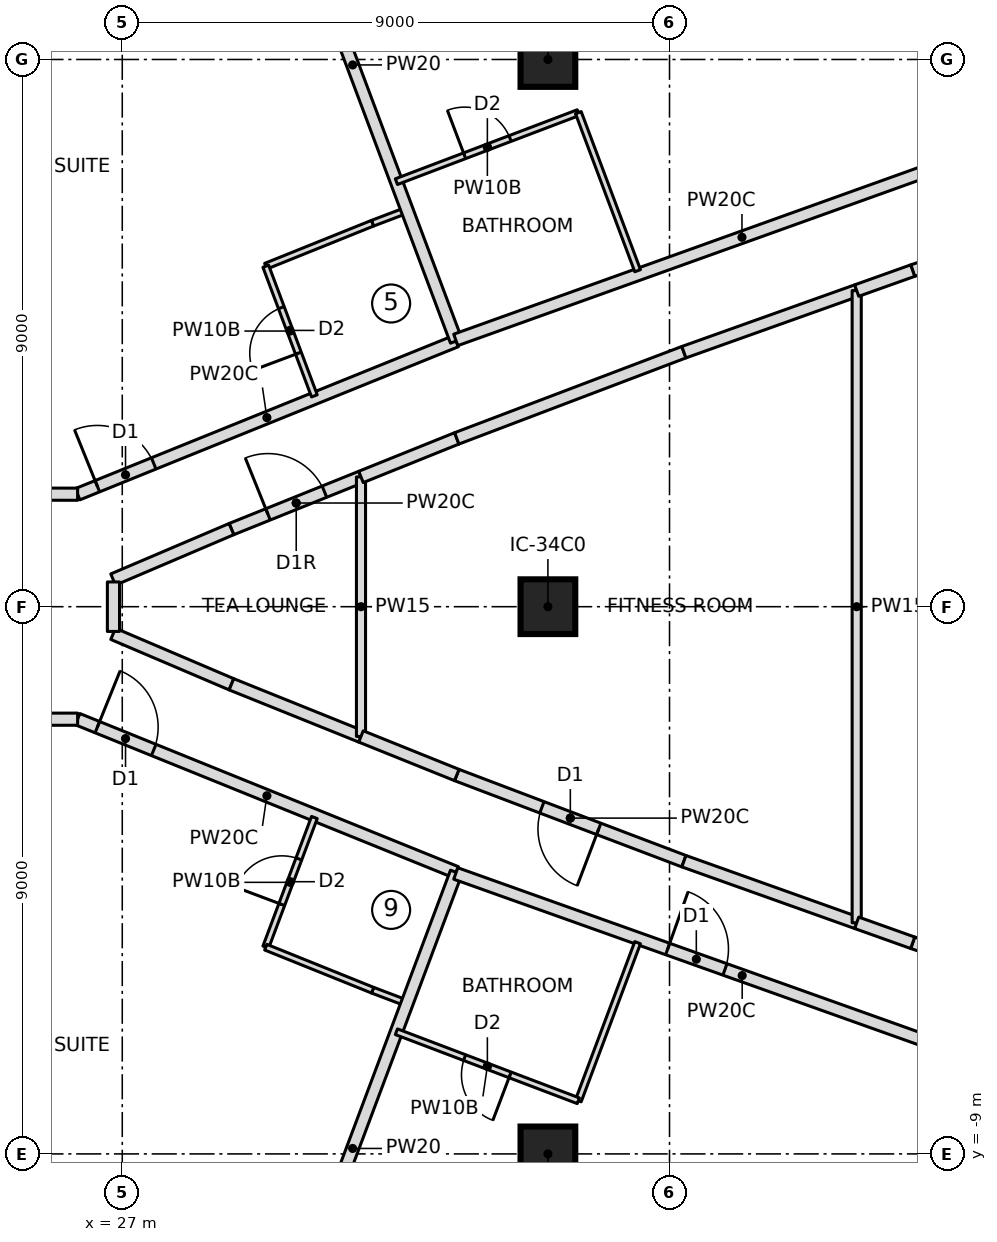
"""IFC4 building model, lengths in metres.
Left out: names, types, materials, properties, quantities, classifications, styles, units other than length and angle.
Written with IfcOpenShell. Run it as: python <this file> out.ifc"""

import sys

from ifc_helpers import new_model, si_unit, direction, frame, frame_2d, origin, origin_2d, place, context, subcontext, project, spatial, rectangle, extrude, element, fill, save


model = new_model("IFC4")
c1 = context("Model", 3, precision=1e-05, world=origin(), true_north=direction((0.0, 1.0)))
c2 = subcontext(c1, "Body", "Model", "MODEL_VIEW")
j1 = project(units=[si_unit("LENGTHUNIT", "METRE"), si_unit("PLANEANGLEUNIT", "RADIAN")], contexts=[c1])
p1 = place(None, origin())
s1 = spatial("IfcSite", under=j1, at=p1, CompositionType="ELEMENT")
p2 = place(p1, origin())
s2 = spatial("IfcBuilding", under=s1, at=p2, CompositionType="ELEMENT")
p3 = place(p2, frame((0.0, 0.0, 231.45)))
s3 = spatial("IfcBuildingStorey", under=s2, at=p3, CompositionType="ELEMENT", Elevation=231.45)
for number, where, z_axis, x_axis in (
    (1, (34.0, -9.0, 0.0), (0.0, 0.0, 1.0), (1.0, 0.0, 0.0)),
    (2, (34.0, 0.0, 0.0), (0.0, 0.0, 1.0), (1.0, 0.0, 0.0)),
    (3, (34.0, 9.0, 0.0), (0.0, 0.0, 1.0), (1.0, 0.0, 0.0)),
):
    element("IfcColumn", number, at=place(p3, frame(where, z_axis=z_axis, x_axis=x_axis)), inside=s3, PredefinedType="COLUMN", context=c2, shape_type="SweptSolid", body=[
        extrude(rectangle(XDim=0.9, YDim=0.9, at=origin_2d()), origin(), (0.0, 0.0, 1.0), 3.55),
    ])
p4 = place(p3, frame((26.266, 1.85, 0.0), z_axis=(0.0, 0.0, 1.0), x_axis=(0.927007906702, 0.375041785555, 0.0)))
e4 = element("IfcWall", 4, at=p4, inside=s3, PredefinedType="PARTITIONING", context=c2, shape_type="SweptSolid", body=[
    extrude(rectangle(XDim=6.716, YDim=0.2, at=frame_2d((3.358, 0.0))), origin(), (0.0, 0.0, 1.0), 3.25),
])
p5 = place(p4, frame((0.35, 0.0, 0.0)))
e5 = element("IfcOpeningElement", 5, at=p5, cuts=e4, PredefinedType="OPENING", context=c2, shape_type="SweptSolid", body=[
    extrude(rectangle(XDim=1.0, YDim=2.1, at=frame_2d((0.5, 1.05))), frame((0.0, 0.11, 0.0), z_axis=(0.0, -1.0, 0.0), x_axis=(1.0, 0.0, 0.0)), (0.0, 0.0, 1.0), 0.22),
])
p6 = place(p3, frame((29.36, 5.6, 0.0), z_axis=(0.0, 0.0, 1.0), x_axis=(0.927594225674, 0.373589283166, 0.0)))
e6 = element("IfcWall", 6, at=p6, inside=s3, PredefinedType="PARTITIONING", context=c2, shape_type="SweptSolid", body=[
    extrude(rectangle(XDim=1.895, YDim=0.1, at=frame_2d((0.947, 0.0))), origin(), (0.0, 0.0, 1.0), 3.25),
])
p7 = place(p3, frame((31.117, 6.308, 0.0), z_axis=(0.0, 0.0, 1.0), x_axis=(0.935048188903, 0.354520640342, 0.0)))
e7 = element("IfcWall", 7, at=p7, inside=s3, PredefinedType="PARTITIONING", context=c2, shape_type="SweptSolid", body=[
    extrude(rectangle(XDim=0.606, YDim=0.1, at=frame_2d((0.303, 0.0))), origin(), (0.0, 0.0, 1.0), 3.25),
])
p8 = place(p3, frame((30.16, 3.467, 0.0), z_axis=(0.0, 0.0, 1.0), x_axis=(-0.351158682313, 0.936315961541, 0.0)))
e8 = element("IfcWall", 8, at=p8, inside=s3, PredefinedType="PARTITIONING", context=c2, shape_type="SweptSolid", body=[
    extrude(rectangle(XDim=2.278, YDim=0.1, at=frame_2d((1.139, 0.0))), origin(), (0.0, 0.0, 1.0), 3.25),
])
p9 = place(p8, frame((0.75, 0.0, 0.0)))
e9 = element("IfcOpeningElement", 9, at=p9, cuts=e8, PredefinedType="OPENING", context=c2, shape_type="SweptSolid", body=[
    extrude(rectangle(XDim=0.8, YDim=2.1, at=frame_2d((0.4, 1.05))), frame((0.0, 0.06, 0.0), z_axis=(0.0, -1.0, 0.0), x_axis=(1.0, 0.0, 0.0)), (0.0, 0.0, 1.0), 0.12),
])
p10 = place(p3, frame((32.492, 4.369, 0.0), z_axis=(0.0, 0.0, 1.0), x_axis=(-0.351128958016, 0.93632710889, 0.0)))
e10 = element("IfcWall", 10, at=p10, inside=s3, PredefinedType="PARTITIONING", context=c2, shape_type="SweptSolid", body=[
    extrude(rectangle(XDim=9.7, YDim=0.2, at=frame_2d((4.85, 0.0))), origin(), (0.0, 0.0, 1.0), 3.25),
])
p11 = place(p3, frame((41.898, 7.764, 0.0), z_axis=(0.0, 0.0, 1.0), x_axis=(-0.941277643829, -0.337633525034, 0.0)))
e11 = element("IfcWall", 11, at=p11, inside=s3, PredefinedType="PARTITIONING", context=c2, shape_type="SweptSolid", body=[
    extrude(rectangle(XDim=10.001, YDim=0.2, at=frame_2d((5.0, 0.0))), origin(), (0.0, 0.0, 1.0), 3.25),
])
p12 = place(p11, frame((0.35, 0.0, 0.0)))
e12 = element("IfcOpeningElement", 12, at=p12, cuts=e11, PredefinedType="OPENING", context=c2, shape_type="SweptSolid", body=[
    extrude(rectangle(XDim=1.0, YDim=2.1, at=frame_2d((0.5, 1.05))), frame((0.0, 0.11, 0.0), z_axis=(0.0, -1.0, 0.0), x_axis=(1.0, 0.0, 0.0)), (0.0, 0.0, 1.0), 0.22),
])
p13 = place(p3, frame((31.509, 6.991, 0.0), z_axis=(0.0, 0.0, 1.0), x_axis=(0.934948661714, 0.354783032232, 0.0)))
e13 = element("IfcWall", 13, at=p13, inside=s3, PredefinedType="PARTITIONING", context=c2, shape_type="SweptSolid", body=[
    extrude(rectangle(XDim=3.2, YDim=0.1, at=frame_2d((1.6, 0.0))), origin(), (0.0, 0.0, 1.0), 3.25),
])
p14 = place(p13, frame((1.2, 0.0, 0.0)))
e14 = element("IfcOpeningElement", 14, at=p14, cuts=e13, PredefinedType="OPENING", context=c2, shape_type="SweptSolid", body=[
    extrude(rectangle(XDim=0.8, YDim=2.1, at=frame_2d((0.4, 1.05))), frame((0.0, 0.06, 0.0), z_axis=(0.0, -1.0, 0.0), x_axis=(1.0, 0.0, 0.0)), (0.0, 0.0, 1.0), 0.12),
])
p15 = place(p3, frame((34.5, 8.126, 0.0), z_axis=(0.0, 0.0, 1.0), x_axis=(0.351065630332, -0.936350854755, 0.0)))
e15 = element("IfcWall", 15, at=p15, inside=s3, PredefinedType="PARTITIONING", context=c2, shape_type="SweptSolid", body=[
    extrude(rectangle(XDim=2.777, YDim=0.1, at=frame_2d((1.388, 0.0))), origin(), (0.0, 0.0, 1.0), 3.25),
])
p16 = place(p3, frame((41.906, 7.746, 0.0), z_axis=(0.0, 0.0, 1.0), x_axis=(-0.35112895446, 0.936327110224, 0.0)))
e16 = element("IfcWall", 16, at=p16, inside=s3, PredefinedType="PARTITIONING", context=c2, shape_type="SweptSolid", body=[
    extrude(rectangle(XDim=9.706, YDim=0.2, at=frame_2d((4.853, 0.0))), origin(), (0.0, 0.0, 1.0), 3.25),
])
p17 = place(p3, frame((26.266, -1.85, 0.0), z_axis=(0.0, 0.0, 1.0), x_axis=(0.927007906702, -0.375041785555, 0.0)))
e17 = element("IfcWall", 17, at=p17, inside=s3, PredefinedType="PARTITIONING", context=c2, shape_type="SweptSolid", body=[
    extrude(rectangle(XDim=6.716, YDim=0.2, at=frame_2d((3.358, 0.0))), origin(), (0.0, 0.0, 1.0), 3.25),
])
p18 = place(p17, frame((0.35, 0.0, 0.0)))
e18 = element("IfcOpeningElement", 18, at=p18, cuts=e17, PredefinedType="OPENING", context=c2, shape_type="SweptSolid", body=[
    extrude(rectangle(XDim=1.0, YDim=2.1, at=frame_2d((0.5, 1.05))), frame((0.0, 0.11, 0.0), z_axis=(0.0, -1.0, 0.0), x_axis=(1.0, 0.0, 0.0)), (0.0, 0.0, 1.0), 0.22),
])
p19 = place(p3, frame((29.36, -5.6, 0.0), z_axis=(0.0, 0.0, 1.0), x_axis=(0.351158682313, 0.936315961541, 0.0)))
e19 = element("IfcWall", 19, at=p19, inside=s3, PredefinedType="PARTITIONING", context=c2, shape_type="SweptSolid", body=[
    extrude(rectangle(XDim=2.278, YDim=0.1, at=frame_2d((1.139, 0.0))), origin(), (0.0, 0.0, 1.0), 3.25),
])
p20 = place(p19, frame((0.75, 0.0, 0.0)))
e20 = element("IfcOpeningElement", 20, at=p20, cuts=e19, PredefinedType="OPENING", context=c2, shape_type="SweptSolid", body=[
    extrude(rectangle(XDim=0.8, YDim=2.1, at=frame_2d((0.4, 1.05))), frame((0.0, 0.06, 0.0), z_axis=(0.0, -1.0, 0.0), x_axis=(1.0, 0.0, 0.0)), (0.0, 0.0, 1.0), 0.12),
])
p21 = place(p3, frame((31.684, -6.522, 0.0), z_axis=(0.0, 0.0, 1.0), x_axis=(-0.935048188903, 0.354520640342, 0.0)))
e21 = element("IfcWall", 21, at=p21, inside=s3, PredefinedType="PARTITIONING", context=c2, shape_type="SweptSolid", body=[
    extrude(rectangle(XDim=0.606, YDim=0.1, at=frame_2d((0.303, 0.0))), origin(), (0.0, 0.0, 1.0), 3.25),
])
p22 = place(p3, frame((31.117, -6.308, 0.0), z_axis=(0.0, 0.0, 1.0), x_axis=(-0.927594225674, 0.373589283166, 0.0)))
e22 = element("IfcWall", 22, at=p22, inside=s3, PredefinedType="PARTITIONING", context=c2, shape_type="SweptSolid", body=[
    extrude(rectangle(XDim=1.895, YDim=0.1, at=frame_2d((0.947, 0.0))), origin(), (0.0, 0.0, 1.0), 3.25),
])
p23 = place(p3, frame((29.086, -13.451, 0.0), z_axis=(0.0, 0.0, 1.0), x_axis=(0.351128958016, 0.93632710889, 0.0)))
e23 = element("IfcWall", 23, at=p23, inside=s3, PredefinedType="PARTITIONING", context=c2, shape_type="SweptSolid", body=[
    extrude(rectangle(XDim=9.7, YDim=0.2, at=frame_2d((4.85, 0.0))), origin(), (0.0, 0.0, 1.0), 3.25),
])
p24 = place(p3, frame((32.485, -4.388, 0.0), z_axis=(0.0, 0.0, 1.0), x_axis=(0.941953797829, -0.335742524498, 0.0)))
e24 = element("IfcWall", 24, at=p24, inside=s3, PredefinedType="PARTITIONING", context=c2, shape_type="SweptSolid", body=[
    extrude(rectangle(XDim=10.001, YDim=0.2, at=frame_2d((5.001, 0.0))), origin(), (0.0, 0.0, 1.0), 3.25),
])
p25 = place(p24, frame((3.7, 0.0, 0.0)))
e25 = element("IfcOpeningElement", 25, at=p25, cuts=e24, PredefinedType="OPENING", context=c2, shape_type="SweptSolid", body=[
    extrude(rectangle(XDim=1.0, YDim=2.1, at=frame_2d((0.5, 1.05))), frame((0.0, 0.11, 0.0), z_axis=(0.0, -1.0, 0.0), x_axis=(1.0, 0.0, 0.0)), (0.0, 0.0, 1.0), 0.22),
])
p26 = place(p3, frame((35.475, -5.526, 0.0), z_axis=(0.0, 0.0, 1.0), x_axis=(-0.351065630332, -0.936350854755, 0.0)))
e26 = element("IfcWall", 26, at=p26, inside=s3, PredefinedType="PARTITIONING", context=c2, shape_type="SweptSolid", body=[
    extrude(rectangle(XDim=2.777, YDim=0.1, at=frame_2d((1.388, 0.0))), origin(), (0.0, 0.0, 1.0), 3.25),
])
p27 = place(p3, frame((34.5, -8.126, 0.0), z_axis=(0.0, 0.0, 1.0), x_axis=(-0.934948661714, 0.354783032232, 0.0)))
e27 = element("IfcWall", 27, at=p27, inside=s3, PredefinedType="PARTITIONING", context=c2, shape_type="SweptSolid", body=[
    extrude(rectangle(XDim=3.2, YDim=0.1, at=frame_2d((1.6, 0.0))), origin(), (0.0, 0.0, 1.0), 3.25),
])
p28 = place(p27, frame((1.2, 0.0, 0.0)))
e28 = element("IfcOpeningElement", 28, at=p28, cuts=e27, PredefinedType="OPENING", context=c2, shape_type="SweptSolid", body=[
    extrude(rectangle(XDim=0.8, YDim=2.1, at=frame_2d((0.4, 1.05))), frame((0.0, 0.06, 0.0), z_axis=(0.0, -1.0, 0.0), x_axis=(1.0, 0.0, 0.0)), (0.0, 0.0, 1.0), 0.12),
])
p29 = place(p3, frame((38.497, -16.834, 0.0), z_axis=(0.0, 0.0, 1.0), x_axis=(0.35112895446, 0.936327110224, 0.0)))
e29 = element("IfcWall", 29, at=p29, inside=s3, PredefinedType="PARTITIONING", context=c2, shape_type="SweptSolid", body=[
    extrude(rectangle(XDim=9.706, YDim=0.2, at=frame_2d((4.853, 0.0))), origin(), (0.0, 0.0, 1.0), 3.25),
])
p30 = place(p3, frame((28.796, 1.276, 0.0), z_axis=(0.0, 0.0, 1.0), x_axis=(0.927609077038, 0.373552406224, 0.0)))
e30 = element("IfcWall", 30, at=p30, inside=s3, PredefinedType="PARTITIONING", context=c2, shape_type="SweptSolid", body=[
    extrude(rectangle(XDim=2.297, YDim=0.2, at=frame_2d((1.148, 0.0))), origin(), (0.0, 0.0, 1.0), 3.25),
])
p31 = place(p30, frame((0.648, 0.0, 0.0)))
e31 = element("IfcOpeningElement", 31, at=p31, cuts=e30, PredefinedType="OPENING", context=c2, shape_type="SweptSolid", body=[
    extrude(rectangle(XDim=1.0, YDim=2.1, at=frame_2d((0.5, 1.05))), frame((0.0, 0.11, 0.0), z_axis=(0.0, -1.0, 0.0), x_axis=(1.0, 0.0, 0.0)), (0.0, 0.0, 1.0), 0.22),
])
for number, where, z_axis, x_axis in (
    (32, (28.796, -1.276, 0.0), (0.0, 0.0, 1.0), (-0.92, 0.392, 0.0)),
    (33, (26.85, 0.447, 0.0), (0.0, 0.0, 1.0), (0.92, 0.392, 0.0)),
):
    element("IfcWall", number, at=place(p3, frame(where, z_axis=z_axis, x_axis=x_axis)), inside=s3, PredefinedType="PARTITIONING", context=c2, shape_type="SweptSolid", body=[
        extrude(rectangle(XDim=2.115, YDim=0.2, at=frame_2d((1.058, 0.0))), origin(), (0.0, 0.0, 1.0), 3.25),
    ])
p32 = place(p3, frame((30.926, -2.134, 0.0), z_axis=(0.0, 0.0, 1.0), x_axis=(-0.927609077038, 0.373552406224, 0.0)))
e34 = element("IfcWall", 34, at=p32, inside=s3, PredefinedType="PARTITIONING", context=c2, shape_type="SweptSolid", body=[
    extrude(rectangle(XDim=2.297, YDim=0.2, at=frame_2d((1.148, 0.0))), origin(), (0.0, 0.0, 1.0), 3.25),
])
p33 = place(p3, frame((30.926, -2.134, 0.0), z_axis=(0.0, 0.0, 1.0), x_axis=(0.0, 1.0, 0.0)))
e35 = element("IfcWall", 35, at=p33, inside=s3, PredefinedType="PARTITIONING", context=c2, shape_type="SweptSolid", body=[
    extrude(rectangle(XDim=4.268, YDim=0.15, at=frame_2d((2.134, 0.0))), origin(), (0.0, 0.0, 1.0), 3.25),
])
p34 = place(p3, frame((36.236, -4.186, 0.0), z_axis=(0.0, 0.0, 1.0), x_axis=(-0.934950696546, 0.354777669856, 0.0)))
e36 = element("IfcWall", 36, at=p34, inside=s3, PredefinedType="PARTITIONING", context=c2, shape_type="SweptSolid", body=[
    extrude(rectangle(XDim=3.995, YDim=0.2, at=frame_2d((1.997, 0.0))), origin(), (0.0, 0.0, 1.0), 3.25),
])
p35 = place(p34, frame((1.498, 0.0, 0.0)))
e37 = element("IfcOpeningElement", 37, at=p35, cuts=e36, PredefinedType="OPENING", context=c2, shape_type="SweptSolid", body=[
    extrude(rectangle(XDim=1.0, YDim=2.1, at=frame_2d((0.5, 1.05))), frame((0.0, 0.11, 0.0), z_axis=(0.0, -1.0, 0.0), x_axis=(1.0, 0.0, 0.0)), (0.0, 0.0, 1.0), 0.22),
])
p36 = place(p3, frame((39.078, -5.199, 0.0), z_axis=(0.0, 0.0, 1.0), x_axis=(-0.941908381697, 0.335869916023, 0.0)))
e38 = element("IfcWall", 38, at=p36, inside=s3, PredefinedType="PARTITIONING", context=c2, shape_type="SweptSolid", body=[
    extrude(rectangle(XDim=3.017, YDim=0.2, at=frame_2d((1.509, 0.0))), origin(), (0.0, 0.0, 1.0), 3.25),
])
for number, where, z_axis, x_axis in (
    (39, (32.501, -2.768, 0.0), (0.0, 0.0, 1.0), (-0.928, 0.373, 0.0)),
    (40, (30.926, 2.134, 0.0), (0.0, 0.0, 1.0), (0.928, 0.373, 0.0)),
):
    element("IfcWall", number, at=place(p3, frame(where, z_axis=z_axis, x_axis=x_axis)), inside=s3, PredefinedType="PARTITIONING", context=c2, shape_type="SweptSolid", body=[
        extrude(rectangle(XDim=1.698, YDim=0.2, at=frame_2d((0.849, 0.0))), origin(), (0.0, 0.0, 1.0), 3.25),
    ])
p37 = place(p3, frame((32.501, 2.768, 0.0), z_axis=(0.0, 0.0, 1.0), x_axis=(0.934950696546, 0.354777669856, 0.0)))
e41 = element("IfcWall", 41, at=p37, inside=s3, PredefinedType="PARTITIONING", context=c2, shape_type="SweptSolid", body=[
    extrude(rectangle(XDim=3.995, YDim=0.2, at=frame_2d((1.997, 0.0))), origin(), (0.0, 0.0, 1.0), 3.25),
])
p38 = place(p3, frame((36.236, 4.186, 0.0), z_axis=(0.0, 0.0, 1.0), x_axis=(0.941908381697, 0.335869916023, 0.0)))
e42 = element("IfcWall", 42, at=p38, inside=s3, PredefinedType="PARTITIONING", context=c2, shape_type="SweptSolid", body=[
    extrude(rectangle(XDim=3.017, YDim=0.2, at=frame_2d((1.509, 0.0))), origin(), (0.0, 0.0, 1.0), 3.25),
])
p39 = place(p3, frame((39.078, -5.199, 0.0), z_axis=(0.0, 0.0, 1.0), x_axis=(0.0, 1.0, 0.0)))
e43 = element("IfcWall", 43, at=p39, inside=s3, PredefinedType="PARTITIONING", context=c2, shape_type="SweptSolid", body=[
    extrude(rectangle(XDim=10.398, YDim=0.15, at=frame_2d((5.199, 0.0))), origin(), (0.0, 0.0, 1.0), 3.25),
])
p40 = place(p3, frame((39.999, 5.527, 0.0), z_axis=(0.0, 0.0, 1.0), x_axis=(0.9484714727, 0.316862534034, 0.0)))
e44 = element("IfcWall", 44, at=p40, inside=s3, PredefinedType="PARTITIONING", context=c2, shape_type="SweptSolid", body=[
    extrude(rectangle(XDim=2.192, YDim=0.2, at=frame_2d((1.096, 0.0))), origin(), (0.0, 0.0, 1.0), 3.25),
])
p41 = place(p40, frame((0.596, 0.0, 0.0)))
e45 = element("IfcOpeningElement", 45, at=p41, cuts=e44, PredefinedType="OPENING", context=c2, shape_type="SweptSolid", body=[
    extrude(rectangle(XDim=1.0, YDim=2.1, at=frame_2d((0.5, 1.05))), frame((0.0, 0.11, 0.0), z_axis=(0.0, -1.0, 0.0), x_axis=(1.0, 0.0, 0.0)), (0.0, 0.0, 1.0), 0.22),
])
p42 = place(p3, frame((42.078, -6.222, 0.0), z_axis=(0.0, 0.0, 1.0), x_axis=(-0.9484714727, 0.316862534034, 0.0)))
e46 = element("IfcWall", 46, at=p42, inside=s3, PredefinedType="PARTITIONING", context=c2, shape_type="SweptSolid", body=[
    extrude(rectangle(XDim=2.192, YDim=0.2, at=frame_2d((1.096, 0.0))), origin(), (0.0, 0.0, 1.0), 3.25),
])
for number, where, z_axis, x_axis in (
    (47, (39.999, -5.527, 0.0), (0.0, 0.0, 1.0), (-0.942, 0.336, 0.0)),
    (48, (39.078, 5.199, 0.0), (0.0, 0.0, 1.0), (0.942, 0.336, 0.0)),
):
    element("IfcWall", number, at=place(p3, frame(where, z_axis=z_axis, x_axis=x_axis)), inside=s3, PredefinedType="PARTITIONING", context=c2, shape_type="SweptSolid", body=[
        extrude(rectangle(XDim=0.978, YDim=0.2, at=frame_2d((0.489, 0.0))), origin(), (0.0, 0.0, 1.0), 3.25),
    ])
p43 = place(p3, frame((26.855, -0.407, 0.0), z_axis=(0.0, 0.0, 1.0), x_axis=(0.0, 1.0, 0.0)))
e49 = element("IfcWall", 49, at=p43, inside=s3, PredefinedType="PARTITIONING", context=c2, shape_type="SweptSolid", body=[
    extrude(rectangle(XDim=0.814, YDim=0.2, at=frame_2d((0.407, 0.0))), origin(), (0.0, 0.0, 1.0), 3.25),
])
p44 = place(p3, frame((26.266, 1.85, 0.0), z_axis=(0.0, 0.0, 1.0), x_axis=(-0.999998892962, 0.001487977051, 0.0)))
e50 = element("IfcWall", 50, at=p44, inside=s3, PredefinedType="PARTITIONING", context=c2, shape_type="SweptSolid", body=[
    extrude(rectangle(XDim=3.117, YDim=0.2, at=frame_2d((1.559, 0.0))), origin(), (0.0, 0.0, 1.0), 3.25),
])
p45 = place(p3, frame((23.148, -1.854, 0.0), z_axis=(0.0, 0.0, 1.0), x_axis=(0.999999006581, 0.001409552241, 0.0)))
e51 = element("IfcWall", 51, at=p45, inside=s3, PredefinedType="PARTITIONING", context=c2, shape_type="SweptSolid", body=[
    extrude(rectangle(XDim=3.118, YDim=0.2, at=frame_2d((1.559, 0.0))), origin(), (0.0, 0.0, 1.0), 3.25),
])
p46 = place(p9, origin())
e52 = element("IfcDoor", 52, at=p46, inside=s3, OperationType="SINGLE_SWING_LEFT", PredefinedType="DOOR", context=c2, shape_type="SweptSolid", body=[
    extrude(rectangle(XDim=0.8, YDim=2.1, at=frame_2d((0.4, 1.05))), frame((0.0, 0.025, 0.0), z_axis=(0.0, -1.0, 0.0), x_axis=(1.0, 0.0, 0.0)), (0.0, 0.0, 1.0), 0.05),
])
fill(e9, e52)
p47 = place(p5, origin())
e53 = element("IfcDoor", 53, at=p47, inside=s3, OperationType="SINGLE_SWING_LEFT", PredefinedType="DOOR", context=c2, shape_type="SweptSolid", body=[
    extrude(rectangle(XDim=1.0, YDim=2.1, at=frame_2d((0.5, 1.05))), frame((0.0, 0.025, 0.0), z_axis=(0.0, -1.0, 0.0), x_axis=(1.0, 0.0, 0.0)), (0.0, 0.0, 1.0), 0.05),
])
fill(e5, e53)
p48 = place(p14, origin())
e54 = element("IfcDoor", 54, at=p48, inside=s3, OperationType="SINGLE_SWING_LEFT", PredefinedType="DOOR", context=c2, shape_type="SweptSolid", body=[
    extrude(rectangle(XDim=0.8, YDim=2.1, at=frame_2d((0.4, 1.05))), frame((0.0, 0.025, 0.0), z_axis=(0.0, -1.0, 0.0), x_axis=(1.0, 0.0, 0.0)), (0.0, 0.0, 1.0), 0.05),
])
fill(e14, e54)
p49 = place(p20, origin())
e55 = element("IfcDoor", 55, at=p49, inside=s3, OperationType="SINGLE_SWING_LEFT", PredefinedType="DOOR", context=c2, shape_type="SweptSolid", body=[
    extrude(rectangle(XDim=0.8, YDim=2.1, at=frame_2d((0.4, 1.05))), frame((0.0, 0.025, 0.0), z_axis=(0.0, -1.0, 0.0), x_axis=(1.0, 0.0, 0.0)), (0.0, 0.0, 1.0), 0.05),
])
fill(e20, e55)
p50 = place(p18, origin())
e56 = element("IfcDoor", 56, at=p50, inside=s3, OperationType="SINGLE_SWING_LEFT", PredefinedType="DOOR", context=c2, shape_type="SweptSolid", body=[
    extrude(rectangle(XDim=1.0, YDim=2.1, at=frame_2d((0.5, 1.05))), frame((0.0, 0.025, 0.0), z_axis=(0.0, -1.0, 0.0), x_axis=(1.0, 0.0, 0.0)), (0.0, 0.0, 1.0), 0.05),
])
fill(e18, e56)
p51 = place(p28, origin())
e57 = element("IfcDoor", 57, at=p51, inside=s3, OperationType="SINGLE_SWING_LEFT", PredefinedType="DOOR", context=c2, shape_type="SweptSolid", body=[
    extrude(rectangle(XDim=0.8, YDim=2.1, at=frame_2d((0.4, 1.05))), frame((0.0, 0.025, 0.0), z_axis=(0.0, -1.0, 0.0), x_axis=(1.0, 0.0, 0.0)), (0.0, 0.0, 1.0), 0.05),
])
fill(e28, e57)
p52 = place(p25, origin())
e58 = element("IfcDoor", 58, at=p52, inside=s3, OperationType="SINGLE_SWING_LEFT", PredefinedType="DOOR", context=c2, shape_type="SweptSolid", body=[
    extrude(rectangle(XDim=1.0, YDim=2.1, at=frame_2d((0.5, 1.05))), frame((0.0, 0.025, 0.0), z_axis=(0.0, -1.0, 0.0), x_axis=(1.0, 0.0, 0.0)), (0.0, 0.0, 1.0), 0.05),
])
fill(e25, e58)
p53 = place(p31, origin())
e59 = element("IfcDoor", 59, at=p53, inside=s3, OperationType="SINGLE_SWING_RIGHT", PredefinedType="DOOR", context=c2, shape_type="SweptSolid", body=[
    extrude(rectangle(XDim=1.0, YDim=2.1, at=frame_2d((0.5, 1.05))), frame((0.0, 0.025, 0.0), z_axis=(0.0, -1.0, 0.0), x_axis=(1.0, 0.0, 0.0)), (0.0, 0.0, 1.0), 0.05),
])
fill(e31, e59)
p54 = place(p35, origin())
e60 = element("IfcDoor", 60, at=p54, inside=s3, OperationType="SINGLE_SWING_LEFT", PredefinedType="DOOR", context=c2, shape_type="SweptSolid", body=[
    extrude(rectangle(XDim=1.0, YDim=2.1, at=frame_2d((0.5, 1.05))), frame((0.0, 0.025, 0.0), z_axis=(0.0, -1.0, 0.0), x_axis=(1.0, 0.0, 0.0)), (0.0, 0.0, 1.0), 0.05),
])
fill(e37, e60)
save(model, sys.argv[1])
